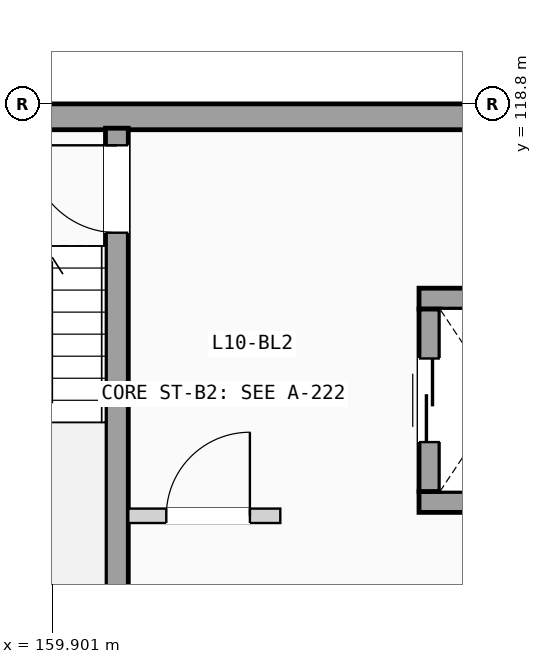
"""IFC4 building model, lengths in metres.
Left out: names, types, materials, properties, quantities, classifications, styles, units other than length and angle.
Written with IfcOpenShell. Run it as: python <this file> out.ifc"""

import sys

from ifc_helpers import new_model, si_unit, direction, frame, frame_2d, origin, place, context, subcontext, project, spatial, rectangle, extrude, element, fill, save


model = new_model("IFC4")
c1 = context("Model", 3, precision=1e-05, world=origin(), true_north=direction((0.0, 1.0)))
c2 = subcontext(c1, "Body", "Model", "MODEL_VIEW")
j1 = project(units=[si_unit("LENGTHUNIT", "METRE"), si_unit("PLANEANGLEUNIT", "RADIAN")], contexts=[c1])
p1 = place(None, origin())
s1 = spatial("IfcSite", under=j1, at=p1, CompositionType="ELEMENT")
p2 = place(p1, origin())
s2 = spatial("IfcBuilding", under=s1, at=p2, CompositionType="ELEMENT")
p3 = place(p2, frame((0.0, 0.0, 34.125)))
s3 = spatial("IfcBuildingStorey", under=s2, at=p3, CompositionType="ELEMENT", Elevation=34.125)
p4 = place(p3, frame((151.2, 118.63, 0.0), z_axis=(0.0, 0.0, 1.0), x_axis=(1.0, 0.0, 0.0)))
e1 = element("IfcWall", 1, at=p4, inside=s3, PredefinedType="SOLIDWALL", context=c2, shape_type="SweptSolid", body=[
    extrude(rectangle(XDim=21.6, YDim=0.34, at=frame_2d((10.8, 0.0))), origin(), (0.0, 0.0, 1.0), 2.89),
])
p5 = place(p3, frame((160.75, 111.48, 0.0), z_axis=(0.0, 0.0, 1.0), x_axis=(0.0, 1.0, 0.0)))
e2 = element("IfcWall", 2, at=p5, inside=s3, PredefinedType="SHEAR", context=c2, shape_type="SweptSolid", body=[
    extrude(rectangle(XDim=7.0, YDim=0.3, at=frame_2d((3.5, 0.0))), origin(), (0.0, 0.0, 1.0), 2.89),
])
p6 = place(p5, frame((5.625, 0.0, 0.0)))
e3 = element("IfcOpeningElement", 3, at=p6, cuts=e2, PredefinedType="OPENING", context=c2, shape_type="SweptSolid", body=[
    extrude(rectangle(XDim=1.15, YDim=2.12, at=frame_2d((0.575, 1.06))), frame((0.0, 0.16, 0.0), z_axis=(0.0, -1.0, 0.0), x_axis=(1.0, 0.0, 0.0)), (0.0, 0.0, 1.0), 0.32),
])
for number, where, z_axis, x_axis in (
    (4, (164.725, 113.562, 0.0), (0.0, 0.0, 1.0), (1.0, 0.0, 0.0)),
    (5, (164.725, 116.238, 0.0), (0.0, 0.0, 1.0), (1.0, 0.0, 0.0)),
):
    element("IfcWall", number, at=place(p3, frame(where, z_axis=z_axis, x_axis=x_axis)), inside=s3, PredefinedType="SHEAR", context=c2, shape_type="SweptSolid", body=[
        extrude(rectangle(XDim=2.15, YDim=0.275, at=frame_2d((1.075, 0.0))), origin(), (0.0, 0.0, 1.0), 2.89),
    ])
p7 = place(p3, frame((164.863, 113.7, 0.0), z_axis=(0.0, 0.0, 1.0), x_axis=(0.0, 1.0, 0.0)))
e6 = element("IfcWall", 6, at=p7, inside=s3, PredefinedType="SHEAR", context=c2, shape_type="SweptSolid", body=[
    extrude(rectangle(XDim=2.4, YDim=0.275, at=frame_2d((1.2, 0.0))), origin(), (0.0, 0.0, 1.0), 2.89),
])
p8 = place(p7, frame((0.65, 0.0, 0.0)))
e7 = element("IfcOpeningElement", 7, at=p8, cuts=e6, PredefinedType="OPENING", context=c2, shape_type="SweptSolid", body=[
    extrude(rectangle(XDim=1.1, YDim=2.15, at=frame_2d((0.55, 1.075))), frame((0.0, 0.147, 0.0), z_axis=(0.0, -1.0, 0.0), x_axis=(1.0, 0.0, 0.0)), (0.0, 0.0, 1.0), 0.295),
])
p9 = place(p3, frame((160.9, 113.38, 0.0), z_axis=(0.0, 0.0, 1.0), x_axis=(1.0, 0.0, 0.0)))
e8 = element("IfcWall", 8, at=p9, inside=s3, PredefinedType="PARTITIONING", context=c2, shape_type="SweptSolid", body=[
    extrude(rectangle(XDim=2.0, YDim=0.19, at=frame_2d((1.0, 0.0))), origin(), (0.0, 0.0, 1.0), 2.87),
])
p10 = place(p9, frame((0.5, 0.0, 0.0)))
e9 = element("IfcOpeningElement", 9, at=p10, cuts=e8, PredefinedType="OPENING", context=c2, shape_type="SweptSolid", body=[
    extrude(rectangle(XDim=1.1, YDim=2.12, at=frame_2d((0.55, 1.06))), frame((0.0, 0.105, 0.0), z_axis=(0.0, -1.0, 0.0), x_axis=(1.0, 0.0, 0.0)), (0.0, 0.0, 1.0), 0.21),
])
p11 = place(p6, origin())
e10 = element("IfcDoor", 10, at=p11, inside=s3, OperationType="SINGLE_SWING_RIGHT", PredefinedType="DOOR", context=c2, shape_type="SweptSolid", body=[
    extrude(rectangle(XDim=1.15, YDim=2.12, at=frame_2d((0.575, 1.06))), frame((0.0, 0.025, 0.0), z_axis=(0.0, -1.0, 0.0), x_axis=(1.0, 0.0, 0.0)), (0.0, 0.0, 1.0), 0.05),
])
fill(e3, e10)
p12 = place(p8, origin())
e11 = element("IfcDoor", 11, at=p12, inside=s3, OperationType="SLIDING_TO_LEFT", PredefinedType="DOOR", context=c2, shape_type="SweptSolid", body=[
    extrude(rectangle(XDim=1.1, YDim=2.15, at=frame_2d((0.55, 1.075))), frame((0.0, 0.025, 0.0), z_axis=(0.0, -1.0, 0.0), x_axis=(1.0, 0.0, 0.0)), (0.0, 0.0, 1.0), 0.05),
])
fill(e7, e11)
p13 = place(p10, origin())
e12 = element("IfcDoor", 12, at=p13, inside=s3, OperationType="SINGLE_SWING_RIGHT", PredefinedType="DOOR", context=c2, shape_type="SweptSolid", body=[
    extrude(rectangle(XDim=1.1, YDim=2.12, at=frame_2d((0.55, 1.06))), frame((0.0, 0.025, 0.0), z_axis=(0.0, -1.0, 0.0), x_axis=(1.0, 0.0, 0.0)), (0.0, 0.0, 1.0), 0.05),
])
fill(e9, e12)
save(model, sys.argv[1])
